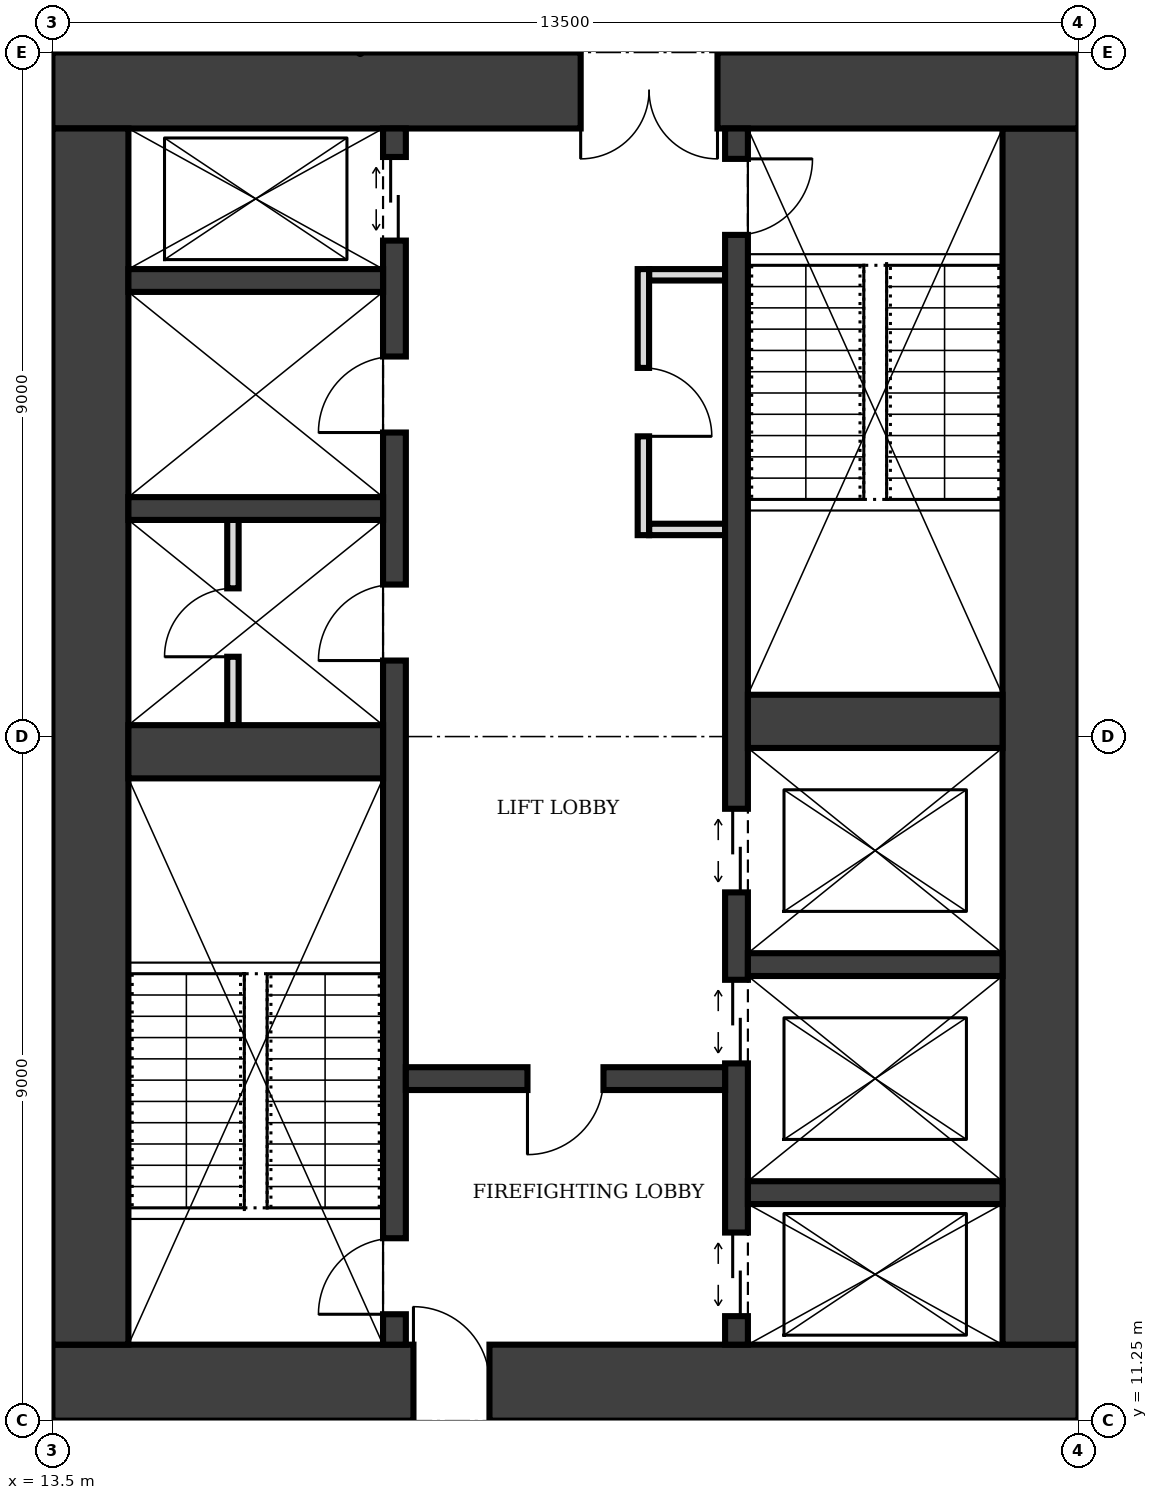
"""IFC4 building model, lengths in metres.
Left out: names, types, materials, properties, quantities, classifications, styles, units other than length and angle.
Written with IfcOpenShell. Run it as: python <this file> out.ifc"""

import sys

from ifc_helpers import new_model, si_unit, direction, frame, frame_2d, origin, place, context, subcontext, project, spatial, rectangle, extrude, element, fill, save


model = new_model("IFC4")
c1 = context("Model", 3, precision=1e-05, world=origin(), true_north=direction((0.0, 1.0)))
c2 = subcontext(c1, "Body", "Model", "MODEL_VIEW")
j1 = project(units=[si_unit("LENGTHUNIT", "METRE"), si_unit("PLANEANGLEUNIT", "RADIAN")], contexts=[c1])
p1 = place(None, origin())
s1 = spatial("IfcSite", under=j1, at=p1, CompositionType="ELEMENT")
p2 = place(p1, origin())
s2 = spatial("IfcBuilding", under=s1, at=p2, CompositionType="ELEMENT")
p3 = place(p2, frame((0.0, 0.0, 181.0)))
s3 = spatial("IfcBuildingStorey", under=s2, at=p3, CompositionType="ELEMENT", Elevation=181.0)
p4 = place(p3, frame((13.5, 11.75, 0.0), z_axis=(0.0, 0.0, 1.0), x_axis=(1.0, 0.0, 0.0)))
e1 = element("IfcWall", 1, at=p4, inside=s3, PredefinedType="SHEAR", context=c2, shape_type="SweptSolid", body=[
    extrude(rectangle(XDim=13.5, YDim=1.0, at=frame_2d((6.75, 0.0))), origin(), (0.0, 0.0, 1.0), 4.0),
])
p5 = place(p4, frame((4.75, 0.0, 0.0)))
e2 = element("IfcOpeningElement", 2, at=p5, cuts=e1, PredefinedType="OPENING", context=c2, shape_type="SweptSolid", body=[
    extrude(rectangle(XDim=1.0, YDim=2.1, at=frame_2d((0.5, 1.05))), frame((0.0, 0.51, 0.0), z_axis=(0.0, -1.0, 0.0), x_axis=(1.0, 0.0, 0.0)), (0.0, 0.0, 1.0), 1.02),
])
p6 = place(p3, frame((26.5, 12.25, 0.0), z_axis=(0.0, 0.0, 1.0), x_axis=(0.0, 1.0, 0.0)))
e3 = element("IfcWall", 3, at=p6, inside=s3, PredefinedType="SHEAR", context=c2, shape_type="SweptSolid", body=[
    extrude(rectangle(XDim=16.0, YDim=1.0, at=frame_2d((8.0, 0.0))), origin(), (0.0, 0.0, 1.0), 4.0),
])
p7 = place(p3, frame((27.0, 28.75, 0.0), z_axis=(0.0, 0.0, 1.0), x_axis=(-1.0, 0.0, 0.0)))
e4 = element("IfcWall", 4, at=p7, inside=s3, PredefinedType="SHEAR", context=c2, shape_type="SweptSolid", body=[
    extrude(rectangle(XDim=13.5, YDim=1.0, at=frame_2d((6.75, 0.0))), origin(), (0.0, 0.0, 1.0), 4.0),
])
p8 = place(p7, frame((4.75, 0.0, 0.0)))
e5 = element("IfcOpeningElement", 5, at=p8, cuts=e4, PredefinedType="OPENING", context=c2, shape_type="SweptSolid", body=[
    extrude(rectangle(XDim=1.8, YDim=2.1, at=frame_2d((0.9, 1.05))), frame((0.0, 0.51, 0.0), z_axis=(0.0, -1.0, 0.0), x_axis=(1.0, 0.0, 0.0)), (0.0, 0.0, 1.0), 1.02),
])
p9 = place(p3, frame((14.0, 28.25, 0.0), z_axis=(0.0, 0.0, 1.0), x_axis=(0.0, -1.0, 0.0)))
e6 = element("IfcWall", 6, at=p9, inside=s3, PredefinedType="SHEAR", context=c2, shape_type="SweptSolid", body=[
    extrude(rectangle(XDim=16.0, YDim=1.0, at=frame_2d((8.0, 0.0))), origin(), (0.0, 0.0, 1.0), 4.0),
])
p10 = place(p3, frame((18.0, 12.25, 0.0), z_axis=(0.0, 0.0, 1.0), x_axis=(0.0, 1.0, 0.0)))
e7 = element("IfcWall", 7, at=p10, inside=s3, PredefinedType="SHEAR", context=c2, shape_type="SweptSolid", body=[
    extrude(rectangle(XDim=16.0, YDim=0.3, at=frame_2d((8.0, 0.0))), origin(), (0.0, 0.0, 1.0), 4.0),
])
p11 = place(p10, frame((0.4, 0.0, 0.0)))
e8 = element("IfcOpeningElement", 8, at=p11, cuts=e7, PredefinedType="OPENING", context=c2, shape_type="SweptSolid", body=[
    extrude(rectangle(XDim=1.0, YDim=2.1, at=frame_2d((0.5, 1.05))), frame((0.0, 0.16, 0.0), z_axis=(0.0, -1.0, 0.0), x_axis=(1.0, 0.0, 0.0)), (0.0, 0.0, 1.0), 0.32),
])
p12 = place(p10, frame((14.525, 0.0, 0.0)))
e9 = element("IfcOpeningElement", 9, at=p12, cuts=e7, PredefinedType="OPENING", context=c2, shape_type="SweptSolid", body=[
    extrude(rectangle(XDim=1.1, YDim=2.1, at=frame_2d((0.55, 1.05))), frame((0.0, 0.16, 0.0), z_axis=(0.0, -1.0, 0.0), x_axis=(1.0, 0.0, 0.0)), (0.0, 0.0, 1.0), 0.32),
])
p13 = place(p10, frame((9.0, 0.0, 0.0)))
e10 = element("IfcOpeningElement", 10, at=p13, cuts=e7, PredefinedType="OPENING", context=c2, shape_type="SweptSolid", body=[
    extrude(rectangle(XDim=1.0, YDim=2.1, at=frame_2d((0.5, 1.05))), frame((0.0, 0.16, 0.0), z_axis=(0.0, -1.0, 0.0), x_axis=(1.0, 0.0, 0.0)), (0.0, 0.0, 1.0), 0.32),
])
p14 = place(p10, frame((12.0, 0.0, 0.0)))
e11 = element("IfcOpeningElement", 11, at=p14, cuts=e7, PredefinedType="OPENING", context=c2, shape_type="SweptSolid", body=[
    extrude(rectangle(XDim=1.0, YDim=2.1, at=frame_2d((0.5, 1.05))), frame((0.0, 0.16, 0.0), z_axis=(0.0, -1.0, 0.0), x_axis=(1.0, 0.0, 0.0)), (0.0, 0.0, 1.0), 0.32),
])
p15 = place(p3, frame((22.5, 12.25, 0.0), z_axis=(0.0, 0.0, 1.0), x_axis=(0.0, 1.0, 0.0)))
e12 = element("IfcWall", 12, at=p15, inside=s3, PredefinedType="SHEAR", context=c2, shape_type="SweptSolid", body=[
    extrude(rectangle(XDim=16.0, YDim=0.3, at=frame_2d((8.0, 0.0))), origin(), (0.0, 0.0, 1.0), 4.0),
])
p16 = place(p15, frame((14.6, 0.0, 0.0)))
e13 = element("IfcOpeningElement", 13, at=p16, cuts=e12, PredefinedType="OPENING", context=c2, shape_type="SweptSolid", body=[
    extrude(rectangle(XDim=1.0, YDim=2.1, at=frame_2d((0.5, 1.05))), frame((0.0, 0.16, 0.0), z_axis=(0.0, -1.0, 0.0), x_axis=(1.0, 0.0, 0.0)), (0.0, 0.0, 1.0), 0.32),
])
p17 = place(p15, frame((0.375, 0.0, 0.0)))
e14 = element("IfcOpeningElement", 14, at=p17, cuts=e12, PredefinedType="OPENING", context=c2, shape_type="SweptSolid", body=[
    extrude(rectangle(XDim=1.1, YDim=2.1, at=frame_2d((0.55, 1.05))), frame((0.0, 0.16, 0.0), z_axis=(0.0, -1.0, 0.0), x_axis=(1.0, 0.0, 0.0)), (0.0, 0.0, 1.0), 0.32),
])
p18 = place(p15, frame((3.7, 0.0, 0.0)))
e15 = element("IfcOpeningElement", 15, at=p18, cuts=e12, PredefinedType="OPENING", context=c2, shape_type="SweptSolid", body=[
    extrude(rectangle(XDim=1.1, YDim=2.1, at=frame_2d((0.55, 1.05))), frame((0.0, 0.16, 0.0), z_axis=(0.0, -1.0, 0.0), x_axis=(1.0, 0.0, 0.0)), (0.0, 0.0, 1.0), 0.32),
])
p19 = place(p15, frame((5.95, 0.0, 0.0)))
e16 = element("IfcOpeningElement", 16, at=p19, cuts=e12, PredefinedType="OPENING", context=c2, shape_type="SweptSolid", body=[
    extrude(rectangle(XDim=1.1, YDim=2.1, at=frame_2d((0.55, 1.05))), frame((0.0, 0.16, 0.0), z_axis=(0.0, -1.0, 0.0), x_axis=(1.0, 0.0, 0.0)), (0.0, 0.0, 1.0), 0.32),
])
p20 = place(p3, frame((14.5, 20.05, 0.0), z_axis=(0.0, 0.0, 1.0), x_axis=(1.0, 0.0, 0.0)))
e17 = element("IfcWall", 17, at=p20, inside=s3, PredefinedType="SHEAR", context=c2, shape_type="SweptSolid", body=[
    extrude(rectangle(XDim=3.35, YDim=0.7, at=frame_2d((1.675, 0.0))), origin(), (0.0, 0.0, 1.0), 4.0),
])
p21 = place(p3, frame((18.15, 15.75, 0.0), z_axis=(0.0, 0.0, 1.0), x_axis=(1.0, 0.0, 0.0)))
e18 = element("IfcWall", 18, at=p21, inside=s3, PredefinedType="SHEAR", context=c2, shape_type="SweptSolid", body=[
    extrude(rectangle(XDim=4.2, YDim=0.3, at=frame_2d((2.1, 0.0))), origin(), (0.0, 0.0, 1.0), 4.0),
])
p22 = place(p21, frame((1.6, 0.0, 0.0)))
e19 = element("IfcOpeningElement", 19, at=p22, cuts=e18, PredefinedType="OPENING", context=c2, shape_type="SweptSolid", body=[
    extrude(rectangle(XDim=1.0, YDim=2.1, at=frame_2d((0.5, 1.05))), frame((0.0, 0.16, 0.0), z_axis=(0.0, -1.0, 0.0), x_axis=(1.0, 0.0, 0.0)), (0.0, 0.0, 1.0), 0.32),
])
for number, where, z_axis, x_axis in (
    (20, (22.65, 14.25, 0.0), (0.0, 0.0, 1.0), (1.0, 0.0, 0.0)),
    (21, (22.65, 17.25, 0.0), (0.0, 0.0, 1.0), (1.0, 0.0, 0.0)),
):
    element("IfcWall", number, at=place(p3, frame(where, z_axis=z_axis, x_axis=x_axis)), inside=s3, PredefinedType="SHEAR", context=c2, shape_type="SweptSolid", body=[
        extrude(rectangle(XDim=3.35, YDim=0.3, at=frame_2d((1.675, 0.0))), origin(), (0.0, 0.0, 1.0), 4.0),
    ])
p23 = place(p3, frame((22.65, 20.45, 0.0), z_axis=(0.0, 0.0, 1.0), x_axis=(1.0, 0.0, 0.0)))
e22 = element("IfcWall", 22, at=p23, inside=s3, PredefinedType="SHEAR", context=c2, shape_type="SweptSolid", body=[
    extrude(rectangle(XDim=3.35, YDim=0.7, at=frame_2d((1.675, 0.0))), origin(), (0.0, 0.0, 1.0), 4.0),
])
for number, where, z_axis, x_axis in (
    (23, (14.5, 23.25, 0.0), (0.0, 0.0, 1.0), (1.0, 0.0, 0.0)),
    (24, (14.5, 26.25, 0.0), (0.0, 0.0, 1.0), (1.0, 0.0, 0.0)),
):
    element("IfcWall", number, at=place(p3, frame(where, z_axis=z_axis, x_axis=x_axis)), inside=s3, PredefinedType="SHEAR", context=c2, shape_type="SweptSolid", body=[
        extrude(rectangle(XDim=3.35, YDim=0.3, at=frame_2d((1.675, 0.0))), origin(), (0.0, 0.0, 1.0), 4.0),
    ])
p24 = place(p3, frame((21.275, 22.9, 0.0), z_axis=(0.0, 0.0, 1.0), x_axis=(0.0, 1.0, 0.0)))
e25 = element("IfcWall", 25, at=p24, inside=s3, PredefinedType="PARTITIONING", context=c2, shape_type="SweptSolid", body=[
    extrude(rectangle(XDim=3.5, YDim=0.15, at=frame_2d((1.75, 0.0))), origin(), (0.0, 0.0, 1.0), 3.75),
])
p25 = place(p24, frame((1.3, 0.0, 0.0)))
e26 = element("IfcOpeningElement", 26, at=p25, cuts=e25, PredefinedType="OPENING", context=c2, shape_type="SweptSolid", body=[
    extrude(rectangle(XDim=0.9, YDim=2.1, at=frame_2d((0.45, 1.05))), frame((0.0, 0.085, 0.0), z_axis=(0.0, -1.0, 0.0), x_axis=(1.0, 0.0, 0.0)), (0.0, 0.0, 1.0), 0.17),
])
for number, where, z_axis, x_axis in (
    (27, (21.35, 22.975, 0.0), (0.0, 0.0, 1.0), (1.0, 0.0, 0.0)),
    (28, (21.35, 26.325, 0.0), (0.0, 0.0, 1.0), (1.0, 0.0, 0.0)),
):
    element("IfcWall", number, at=place(p3, frame(where, z_axis=z_axis, x_axis=x_axis)), inside=s3, PredefinedType="PARTITIONING", context=c2, shape_type="SweptSolid", body=[
        extrude(rectangle(XDim=1.0, YDim=0.15, at=frame_2d((0.5, 0.0))), origin(), (0.0, 0.0, 1.0), 3.75),
    ])
p26 = place(p3, frame((15.875, 20.4, 0.0), z_axis=(0.0, 0.0, 1.0), x_axis=(0.0, 1.0, 0.0)))
e29 = element("IfcWall", 29, at=p26, inside=s3, PredefinedType="PARTITIONING", context=c2, shape_type="SweptSolid", body=[
    extrude(rectangle(XDim=2.7, YDim=0.15, at=frame_2d((1.35, 0.0))), origin(), (0.0, 0.0, 1.0), 3.75),
])
p27 = place(p26, frame((0.9, 0.0, 0.0)))
e30 = element("IfcOpeningElement", 30, at=p27, cuts=e29, PredefinedType="OPENING", context=c2, shape_type="SweptSolid", body=[
    extrude(rectangle(XDim=0.9, YDim=2.1, at=frame_2d((0.45, 1.05))), frame((0.0, 0.085, 0.0), z_axis=(0.0, -1.0, 0.0), x_axis=(1.0, 0.0, 0.0)), (0.0, 0.0, 1.0), 0.17),
])
p28 = place(p5, origin())
e31 = element("IfcDoor", 31, at=p28, inside=s3, OperationType="SINGLE_SWING_LEFT", PredefinedType="DOOR", context=c2, shape_type="SweptSolid", body=[
    extrude(rectangle(XDim=1.0, YDim=2.1, at=frame_2d((0.5, 1.05))), frame((0.0, 0.025, 0.0), z_axis=(0.0, -1.0, 0.0), x_axis=(1.0, 0.0, 0.0)), (0.0, 0.0, 1.0), 0.05),
])
fill(e2, e31)
p29 = place(p8, origin())
e32 = element("IfcDoor", 32, at=p29, inside=s3, OperationType="DOUBLE_DOOR_SINGLE_SWING", PredefinedType="DOOR", context=c2, shape_type="SweptSolid", body=[
    extrude(rectangle(XDim=1.8, YDim=2.1, at=frame_2d((0.9, 1.05))), frame((0.0, 0.025, 0.0), z_axis=(0.0, -1.0, 0.0), x_axis=(1.0, 0.0, 0.0)), (0.0, 0.0, 1.0), 0.05),
])
fill(e5, e32)
p30 = place(p22, frame((1.0, 0.0, 0.0), z_axis=(0.0, 0.0, 1.0), x_axis=(-1.0, 0.0, 0.0)))
e33 = element("IfcDoor", 33, at=p30, inside=s3, OperationType="SINGLE_SWING_RIGHT", PredefinedType="DOOR", context=c2, shape_type="SweptSolid", body=[
    extrude(rectangle(XDim=1.0, YDim=2.1, at=frame_2d((0.5, 1.05))), frame((0.0, 0.025, 0.0), z_axis=(0.0, -1.0, 0.0), x_axis=(1.0, 0.0, 0.0)), (0.0, 0.0, 1.0), 0.05),
])
fill(e19, e33)
p31 = place(p11, origin())
e34 = element("IfcDoor", 34, at=p31, inside=s3, OperationType="SINGLE_SWING_LEFT", PredefinedType="DOOR", context=c2, shape_type="SweptSolid", body=[
    extrude(rectangle(XDim=1.0, YDim=2.1, at=frame_2d((0.5, 1.05))), frame((0.0, 0.025, 0.0), z_axis=(0.0, -1.0, 0.0), x_axis=(1.0, 0.0, 0.0)), (0.0, 0.0, 1.0), 0.05),
])
fill(e8, e34)
p32 = place(p16, frame((1.0, 0.0, 0.0), z_axis=(0.0, 0.0, 1.0), x_axis=(-1.0, 0.0, 0.0)))
e35 = element("IfcDoor", 35, at=p32, inside=s3, OperationType="SINGLE_SWING_LEFT", PredefinedType="DOOR", context=c2, shape_type="SweptSolid", body=[
    extrude(rectangle(XDim=1.0, YDim=2.1, at=frame_2d((0.5, 1.05))), frame((0.0, 0.025, 0.0), z_axis=(0.0, -1.0, 0.0), x_axis=(1.0, 0.0, 0.0)), (0.0, 0.0, 1.0), 0.05),
])
fill(e13, e35)
p33 = place(p17, origin())
e36 = element("IfcDoor", 36, at=p33, inside=s3, OperationType="DOUBLE_DOOR_SLIDING", PredefinedType="DOOR", context=c2, shape_type="SweptSolid", body=[
    extrude(rectangle(XDim=1.1, YDim=2.1, at=frame_2d((0.55, 1.05))), frame((0.0, 0.025, 0.0), z_axis=(0.0, -1.0, 0.0), x_axis=(1.0, 0.0, 0.0)), (0.0, 0.0, 1.0), 0.05),
])
fill(e14, e36)
p34 = place(p12, origin())
e37 = element("IfcDoor", 37, at=p34, inside=s3, OperationType="DOUBLE_DOOR_SLIDING", PredefinedType="DOOR", context=c2, shape_type="SweptSolid", body=[
    extrude(rectangle(XDim=1.1, YDim=2.1, at=frame_2d((0.55, 1.05))), frame((0.0, 0.025, 0.0), z_axis=(0.0, -1.0, 0.0), x_axis=(1.0, 0.0, 0.0)), (0.0, 0.0, 1.0), 0.05),
])
fill(e9, e37)
p35 = place(p18, origin())
e38 = element("IfcDoor", 38, at=p35, inside=s3, OperationType="DOUBLE_DOOR_SLIDING", PredefinedType="DOOR", context=c2, shape_type="SweptSolid", body=[
    extrude(rectangle(XDim=1.1, YDim=2.1, at=frame_2d((0.55, 1.05))), frame((0.0, 0.025, 0.0), z_axis=(0.0, -1.0, 0.0), x_axis=(1.0, 0.0, 0.0)), (0.0, 0.0, 1.0), 0.05),
])
fill(e15, e38)
p36 = place(p19, origin())
e39 = element("IfcDoor", 39, at=p36, inside=s3, OperationType="DOUBLE_DOOR_SLIDING", PredefinedType="DOOR", context=c2, shape_type="SweptSolid", body=[
    extrude(rectangle(XDim=1.1, YDim=2.1, at=frame_2d((0.55, 1.05))), frame((0.0, 0.025, 0.0), z_axis=(0.0, -1.0, 0.0), x_axis=(1.0, 0.0, 0.0)), (0.0, 0.0, 1.0), 0.05),
])
fill(e16, e39)
p37 = place(p25, frame((0.9, 0.0, 0.0), z_axis=(0.0, 0.0, 1.0), x_axis=(-1.0, 0.0, 0.0)))
e40 = element("IfcDoor", 40, at=p37, inside=s3, OperationType="SINGLE_SWING_RIGHT", PredefinedType="DOOR", context=c2, shape_type="SweptSolid", body=[
    extrude(rectangle(XDim=0.9, YDim=2.1, at=frame_2d((0.45, 1.05))), frame((0.0, 0.025, 0.0), z_axis=(0.0, -1.0, 0.0), x_axis=(1.0, 0.0, 0.0)), (0.0, 0.0, 1.0), 0.05),
])
fill(e26, e40)
p38 = place(p13, origin())
e41 = element("IfcDoor", 41, at=p38, inside=s3, OperationType="SINGLE_SWING_LEFT", PredefinedType="DOOR", context=c2, shape_type="SweptSolid", body=[
    extrude(rectangle(XDim=1.0, YDim=2.1, at=frame_2d((0.5, 1.05))), frame((0.0, 0.025, 0.0), z_axis=(0.0, -1.0, 0.0), x_axis=(1.0, 0.0, 0.0)), (0.0, 0.0, 1.0), 0.05),
])
fill(e10, e41)
p39 = place(p27, origin())
e42 = element("IfcDoor", 42, at=p39, inside=s3, OperationType="SINGLE_SWING_LEFT", PredefinedType="DOOR", context=c2, shape_type="SweptSolid", body=[
    extrude(rectangle(XDim=0.9, YDim=2.1, at=frame_2d((0.45, 1.05))), frame((0.0, 0.025, 0.0), z_axis=(0.0, -1.0, 0.0), x_axis=(1.0, 0.0, 0.0)), (0.0, 0.0, 1.0), 0.05),
])
fill(e30, e42)
p40 = place(p14, origin())
e43 = element("IfcDoor", 43, at=p40, inside=s3, OperationType="SINGLE_SWING_LEFT", PredefinedType="DOOR", context=c2, shape_type="SweptSolid", body=[
    extrude(rectangle(XDim=1.0, YDim=2.1, at=frame_2d((0.5, 1.05))), frame((0.0, 0.025, 0.0), z_axis=(0.0, -1.0, 0.0), x_axis=(1.0, 0.0, 0.0)), (0.0, 0.0, 1.0), 0.05),
])
fill(e11, e43)
save(model, sys.argv[1])
